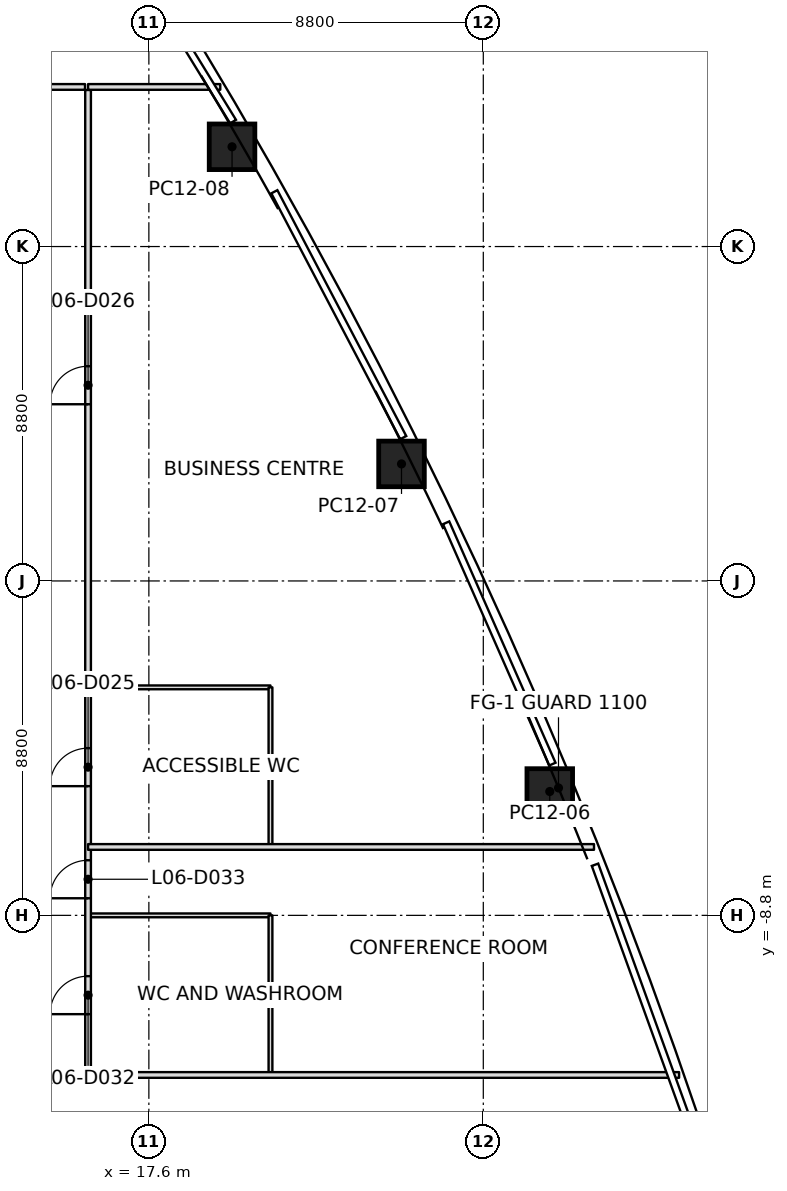
"""IFC4 building model, lengths in metres.
Left out: names, types, materials, properties, quantities, classifications, styles, units other than length and angle.
Written with IfcOpenShell. Run it as: python <this file> out.ifc"""

import sys

from ifc_helpers import new_model, si_unit, direction, frame, frame_2d, origin, origin_2d, place, context, subcontext, project, spatial, rectangle, extrude, clip, halfspace, element, fill, save


model = new_model("IFC4")
c1 = context("Model", 3, precision=1e-05, world=origin(), true_north=direction((0.0, 1.0)))
c2 = subcontext(c1, "Body", "Model", "MODEL_VIEW")
j1 = project(units=[si_unit("LENGTHUNIT", "METRE"), si_unit("PLANEANGLEUNIT", "RADIAN")], contexts=[c1])
p1 = place(None, origin())
s1 = spatial("IfcSite", under=j1, at=p1, CompositionType="ELEMENT")
p2 = place(p1, origin())
s2 = spatial("IfcBuilding", under=s1, at=p2, CompositionType="ELEMENT")
p3 = place(p2, frame((0.0, 0.0, 40.8)))
s3 = spatial("IfcBuildingStorey", under=s2, at=p3, CompositionType="ELEMENT", Elevation=40.8)
p4 = place(p3, frame((28.149, -5.541, 0.0), z_axis=(-0.010002391004, 0.0056623705, 0.999933942685), x_axis=(-0.382116007495, 0.924069998434, -0.009055098571)))
e1 = element("IfcColumn", 1, at=p4, inside=s3, PredefinedType="COLUMN", context=c2, shape_type="SweptSolid", body=[
    clip(clip(extrude(rectangle(XDim=1.2, YDim=1.2, at=origin_2d()), origin(), (0.0, 0.0, 1.0), 7.2), halfspace(frame((0.0, 0.0, 0.01)), True)), halfspace(frame((0.0, 0.0, 7.196)), False)),
])
p5 = place(p3, frame((24.248, 3.08, 0.0), z_axis=(-0.007866557869, 0.001186765196, 0.999968353927), x_axis=(-0.442008886262, 0.896999173291, -0.004541759611)))
e2 = element("IfcColumn", 2, at=p5, inside=s3, PredefinedType="COLUMN", context=c2, shape_type="SweptSolid", body=[
    clip(clip(extrude(rectangle(XDim=1.2, YDim=1.2, at=origin_2d()), origin(), (0.0, 0.0, 1.0), 7.2), halfspace(frame((0.0, 0.0, 0.008)), True)), halfspace(frame((0.0, 0.0, 7.197)), False)),
])
p6 = place(p3, frame((19.789, 11.425, 0.0), z_axis=(-0.005526997469, -0.003187348234, 0.999979646348), x_axis=(-0.499992363016, 0.866029812948, -3.117994e-06)))
e3 = element("IfcColumn", 3, at=p6, inside=s3, PredefinedType="COLUMN", context=c2, shape_type="SweptSolid", body=[
    clip(clip(extrude(rectangle(XDim=1.2, YDim=1.2, at=origin_2d()), origin(), (0.0, 0.0, 1.0), 7.2), halfspace(frame((0.0, 0.0, 0.007)), True)), halfspace(frame((0.0, 0.0, 7.198)), False)),
])
p7 = place(p3, frame((16.0, -13.0, 0.0), z_axis=(0.0, 0.0, 1.0), x_axis=(1.0, 0.0, 0.0)))
e4 = element("IfcWall", 4, at=p7, inside=s3, PredefinedType="PARTITIONING", context=c2, shape_type="SweptSolid", body=[
    extrude(rectangle(XDim=15.552, YDim=0.15, at=frame_2d((7.776, 0.0))), origin(), (0.0, 0.0, 1.0), 6.297),
])
p8 = place(p3, frame((29.313, -7.0, 0.0), z_axis=(0.0, 0.0, 1.0), x_axis=(-1.0, 0.0, 0.0)))
e5 = element("IfcWall", 5, at=p8, inside=s3, PredefinedType="PARTITIONING", context=c2, shape_type="SweptSolid", body=[
    extrude(rectangle(XDim=13.313, YDim=0.15, at=frame_2d((6.656, 0.0))), origin(), (0.0, 0.0, 1.0), 6.434),
])
p9 = place(p3, frame((16.0, 13.0, 0.0), z_axis=(0.0, 0.0, 1.0), x_axis=(1.0, 0.0, 0.0)))
e6 = element("IfcWall", 6, at=p9, inside=s3, PredefinedType="PARTITIONING", context=c2, shape_type="SweptSolid", body=[
    extrude(rectangle(XDim=3.479, YDim=0.15, at=frame_2d((1.74, 0.0))), origin(), (0.0, 0.0, 1.0), 6.434),
])
p10 = place(p3, frame((-15.92, -13.0, 0.0), z_axis=(0.0, 0.0, 1.0), x_axis=(1.0, 0.0, 0.0)))
e7 = element("IfcWall", 7, at=p10, inside=s3, PredefinedType="PARTITIONING", context=c2, shape_type="SweptSolid", body=[
    extrude(rectangle(XDim=31.84, YDim=0.15, at=frame_2d((15.92, 0.0))), origin(), (0.0, 0.0, 1.0), 6.447),
])
p11 = place(p10, frame((5.41, 0.0, 0.0)))
e8 = element("IfcOpeningElement", 8, at=p11, cuts=e7, PredefinedType="OPENING", context=c2, shape_type="SweptSolid", body=[
    extrude(rectangle(XDim=1.0, YDim=2.1, at=frame_2d((0.5, 1.05))), frame((0.0, 0.075, 0.0), z_axis=(0.0, -1.0, 0.0), x_axis=(1.0, 0.0, 0.0)), (0.0, 0.0, 1.0), 0.15),
])
p12 = place(p10, frame((21.43, 0.0, 0.0)))
e9 = element("IfcOpeningElement", 9, at=p12, cuts=e7, PredefinedType="OPENING", context=c2, shape_type="SweptSolid", body=[
    extrude(rectangle(XDim=1.0, YDim=2.1, at=frame_2d((0.5, 1.05))), frame((0.0, 0.075, 0.0), z_axis=(0.0, -1.0, 0.0), x_axis=(1.0, 0.0, 0.0)), (0.0, 0.0, 1.0), 0.15),
])
p13 = place(p3, frame((15.92, 13.0, 0.0), z_axis=(0.0, 0.0, 1.0), x_axis=(-1.0, 0.0, 0.0)))
e10 = element("IfcWall", 10, at=p13, inside=s3, PredefinedType="PARTITIONING", context=c2, shape_type="SweptSolid", body=[
    extrude(rectangle(XDim=31.84, YDim=0.15, at=frame_2d((15.92, 0.0))), origin(), (0.0, 0.0, 1.0), 6.297),
])
p14 = place(p13, frame((5.01, 0.0, 0.0)))
e11 = element("IfcOpeningElement", 11, at=p14, cuts=e10, PredefinedType="OPENING", context=c2, shape_type="SweptSolid", body=[
    extrude(rectangle(XDim=1.8, YDim=2.1, at=frame_2d((0.9, 1.05))), frame((0.0, 0.075, 0.0), z_axis=(0.0, -1.0, 0.0), x_axis=(1.0, 0.0, 0.0)), (0.0, 0.0, 1.0), 0.15),
])
p15 = place(p13, frame((21.23, 0.0, 0.0)))
e12 = element("IfcOpeningElement", 12, at=p15, cuts=e10, PredefinedType="OPENING", context=c2, shape_type="SweptSolid", body=[
    extrude(rectangle(XDim=1.4, YDim=2.1, at=frame_2d((0.7, 1.05))), frame((0.0, 0.075, 0.0), z_axis=(0.0, -1.0, 0.0), x_axis=(1.0, 0.0, 0.0)), (0.0, 0.0, 1.0), 0.15),
])
p16 = place(p3, frame((16.0, -12.92, 0.0), z_axis=(0.0, 0.0, 1.0), x_axis=(0.0, 1.0, 0.0)))
e13 = element("IfcWall", 13, at=p16, inside=s3, PredefinedType="PARTITIONING", context=c2, shape_type="SweptSolid", body=[
    extrude(rectangle(XDim=25.84, YDim=0.15, at=frame_2d((12.92, 0.0))), origin(), (0.0, 0.0, 1.0), 6.297),
])
p17 = place(p16, frame((7.52, 0.0, 0.0)))
e14 = element("IfcOpeningElement", 14, at=p17, cuts=e13, PredefinedType="OPENING", context=c2, shape_type="SweptSolid", body=[
    extrude(rectangle(XDim=1.0, YDim=2.1, at=frame_2d((0.5, 1.05))), frame((0.0, 0.075, 0.0), z_axis=(0.0, -1.0, 0.0), x_axis=(1.0, 0.0, 0.0)), (0.0, 0.0, 1.0), 0.15),
])
p18 = place(p16, frame((17.57, 0.0, 0.0)))
e15 = element("IfcOpeningElement", 15, at=p18, cuts=e13, PredefinedType="OPENING", context=c2, shape_type="SweptSolid", body=[
    extrude(rectangle(XDim=1.0, YDim=2.1, at=frame_2d((0.5, 1.05))), frame((0.0, 0.075, 0.0), z_axis=(0.0, -1.0, 0.0), x_axis=(1.0, 0.0, 0.0)), (0.0, 0.0, 1.0), 0.15),
])
p19 = place(p16, frame((1.52, 0.0, 0.0)))
e16 = element("IfcOpeningElement", 16, at=p19, cuts=e13, PredefinedType="OPENING", context=c2, shape_type="SweptSolid", body=[
    extrude(rectangle(XDim=1.0, YDim=2.1, at=frame_2d((0.5, 1.05))), frame((0.0, 0.075, 0.0), z_axis=(0.0, -1.0, 0.0), x_axis=(1.0, 0.0, 0.0)), (0.0, 0.0, 1.0), 0.15),
])
p20 = place(p16, frame((4.57, 0.0, 0.0)))
e17 = element("IfcOpeningElement", 17, at=p20, cuts=e13, PredefinedType="OPENING", context=c2, shape_type="SweptSolid", body=[
    extrude(rectangle(XDim=1.0, YDim=2.1, at=frame_2d((0.5, 1.05))), frame((0.0, 0.075, 0.0), z_axis=(0.0, -1.0, 0.0), x_axis=(1.0, 0.0, 0.0)), (0.0, 0.0, 1.0), 0.15),
])
p21 = place(p3, frame((16.03, -8.8, 0.0), z_axis=(0.0, 0.0, 1.0), x_axis=(1.0, 0.0, 0.0)))
e18 = element("IfcWall", 18, at=p21, inside=s3, PredefinedType="PARTITIONING", context=c2, shape_type="SweptSolid", body=[
    extrude(rectangle(XDim=4.77, YDim=0.1, at=frame_2d((2.385, 0.0))), origin(), (0.0, 0.0, 1.0), 6.447),
])
p22 = place(p3, frame((20.8, -8.8, 0.0), z_axis=(0.0, 0.0, 1.0), x_axis=(0.0, -1.0, 0.0)))
e19 = element("IfcWall", 19, at=p22, inside=s3, PredefinedType="PARTITIONING", context=c2, shape_type="SweptSolid", body=[
    extrude(rectangle(XDim=4.17, YDim=0.1, at=frame_2d((2.085, 0.0))), origin(), (0.0, 0.0, 1.0), 6.297),
])
p23 = place(p3, frame((16.03, -2.8, 0.0), z_axis=(0.0, 0.0, 1.0), x_axis=(1.0, 0.0, 0.0)))
e20 = element("IfcWall", 20, at=p23, inside=s3, PredefinedType="PARTITIONING", context=c2, shape_type="SweptSolid", body=[
    extrude(rectangle(XDim=4.77, YDim=0.1, at=frame_2d((2.385, 0.0))), origin(), (0.0, 0.0, 1.0), 6.447),
])
p24 = place(p3, frame((20.8, -2.8, 0.0), z_axis=(0.0, 0.0, 1.0), x_axis=(0.0, -1.0, 0.0)))
e21 = element("IfcWall", 21, at=p24, inside=s3, PredefinedType="PARTITIONING", context=c2, shape_type="SweptSolid", body=[
    extrude(rectangle(XDim=4.17, YDim=0.1, at=frame_2d((2.085, 0.0))), origin(), (0.0, 0.0, 1.0), 6.447),
])
p25 = place(p17, origin())
e22 = element("IfcDoor", 22, at=p25, inside=s3, OperationType="SINGLE_SWING_RIGHT", PredefinedType="DOOR", context=c2, shape_type="SweptSolid", body=[
    extrude(rectangle(XDim=1.0, YDim=2.1, at=frame_2d((0.5, 1.05))), frame((0.0, 0.025, 0.0), z_axis=(0.0, -1.0, 0.0), x_axis=(1.0, 0.0, 0.0)), (0.0, 0.0, 1.0), 0.05),
])
fill(e14, e22)
p26 = place(p18, origin())
e23 = element("IfcDoor", 23, at=p26, inside=s3, OperationType="SINGLE_SWING_LEFT", PredefinedType="DOOR", context=c2, shape_type="SweptSolid", body=[
    extrude(rectangle(XDim=1.0, YDim=2.1, at=frame_2d((0.5, 1.05))), frame((0.0, 0.025, 0.0), z_axis=(0.0, -1.0, 0.0), x_axis=(1.0, 0.0, 0.0)), (0.0, 0.0, 1.0), 0.05),
])
fill(e15, e23)
p27 = place(p19, origin())
e24 = element("IfcDoor", 24, at=p27, inside=s3, OperationType="SINGLE_SWING_RIGHT", PredefinedType="DOOR", context=c2, shape_type="SweptSolid", body=[
    extrude(rectangle(XDim=1.0, YDim=2.1, at=frame_2d((0.5, 1.05))), frame((0.0, 0.025, 0.0), z_axis=(0.0, -1.0, 0.0), x_axis=(1.0, 0.0, 0.0)), (0.0, 0.0, 1.0), 0.05),
])
fill(e16, e24)
p28 = place(p20, origin())
e25 = element("IfcDoor", 25, at=p28, inside=s3, OperationType="SINGLE_SWING_LEFT", PredefinedType="DOOR", context=c2, shape_type="SweptSolid", body=[
    extrude(rectangle(XDim=1.0, YDim=2.1, at=frame_2d((0.5, 1.05))), frame((0.0, 0.025, 0.0), z_axis=(0.0, -1.0, 0.0), x_axis=(1.0, 0.0, 0.0)), (0.0, 0.0, 1.0), 0.05),
])
fill(e17, e25)
save(model, sys.argv[1])
